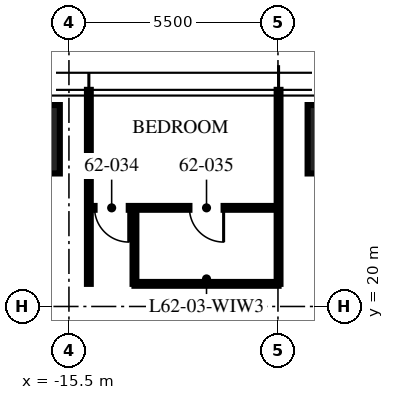
"""IFC4 building model, lengths in metres.
Left out: names, types, materials, properties, quantities, classifications, styles, units other than length and angle.
Written with IfcOpenShell. Run it as: python <this file> out.ifc"""

import sys

from ifc_helpers import new_model, si_unit, direction, frame, frame_2d, origin, origin_2d, place, context, subcontext, project, spatial, rectangle, extrude, element, fill, save


model = new_model("IFC4")
c1 = context("Model", 3, precision=1e-05, world=origin(), true_north=direction((0.0, 1.0)))
c2 = subcontext(c1, "Body", "Model", "MODEL_VIEW")
j1 = project(units=[si_unit("LENGTHUNIT", "METRE"), si_unit("PLANEANGLEUNIT", "RADIAN")], contexts=[c1])
p1 = place(None, origin())
s1 = spatial("IfcSite", under=j1, at=p1, CompositionType="ELEMENT")
p2 = place(p1, origin())
s2 = spatial("IfcBuilding", under=s1, at=p2, CompositionType="ELEMENT")
p3 = place(p2, frame((0.0, 0.0, 248.25)))
s3 = spatial("IfcBuildingStorey", under=s2, at=p3, CompositionType="ELEMENT", Elevation=248.25)
for number, where, z_axis, x_axis in (
    (1, (-16.64, 24.4, 0.0), (0.0, 0.0, 1.0), (1.0, 0.0, 0.0)),
    (2, (-8.32, 24.4, 0.0), (0.0, 0.0, 1.0), (1.0, 0.0, 0.0)),
):
    element("IfcColumn", number, at=place(p3, frame(where, z_axis=z_axis, x_axis=x_axis)), inside=s3, PredefinedType="COLUMN", context=c2, shape_type="SweptSolid", body=[
        extrude(rectangle(XDim=1.8, YDim=1.8, at=origin_2d()), origin(), (0.0, 0.0, 1.0), 3.75),
    ])
for number, where, z_axis, x_axis in (
    (3, (-9.984, 20.595, 0.0), (0.0, 0.0, 1.0), (0.0, 1.0, 0.0)),
    (4, (-14.976, 20.595, 0.0), (0.0, 0.0, 1.0), (0.0, 1.0, 0.0)),
):
    element("IfcWall", number, at=place(p3, frame(where, z_axis=z_axis, x_axis=x_axis)), inside=s3, PredefinedType="PARTITIONING", context=c2, shape_type="SweptSolid", body=[
        extrude(rectangle(XDim=5.105, YDim=0.1, at=frame_2d((2.552, 0.0))), origin(), (0.0, 0.0, 1.0), 2.91),
    ])
p4 = place(p3, frame((-9.984, 22.595, 0.0), z_axis=(0.0, 0.0, 1.0), x_axis=(-1.0, 0.0, 0.0)))
e5 = element("IfcWall", 5, at=p4, inside=s3, PredefinedType="PARTITIONING", context=c2, shape_type="SweptSolid", body=[
    extrude(rectangle(XDim=4.992, YDim=0.1, at=frame_2d((2.496, 0.0))), origin(), (0.0, 0.0, 1.0), 2.81),
])
p5 = place(p4, frame((3.942, 0.0, 0.0)))
e6 = element("IfcOpeningElement", 6, at=p5, cuts=e5, PredefinedType="OPENING", context=c2, shape_type="SweptSolid", body=[
    extrude(rectangle(XDim=0.9, YDim=2.1, at=frame_2d((0.45, 1.05))), frame((0.0, 0.06, 0.0), z_axis=(0.0, -1.0, 0.0), x_axis=(1.0, 0.0, 0.0)), (0.0, 0.0, 1.0), 0.12),
])
p6 = place(p4, frame((1.446, 0.0, 0.0)))
e7 = element("IfcOpeningElement", 7, at=p6, cuts=e5, PredefinedType="OPENING", context=c2, shape_type="SweptSolid", body=[
    extrude(rectangle(XDim=0.9, YDim=2.1, at=frame_2d((0.45, 1.05))), frame((0.0, 0.06, 0.0), z_axis=(0.0, -1.0, 0.0), x_axis=(1.0, 0.0, 0.0)), (0.0, 0.0, 1.0), 0.12),
])
p7 = place(p3, frame((-13.776, 20.595, 0.0), z_axis=(0.0, 0.0, 1.0), x_axis=(0.0, 1.0, 0.0)))
e8 = element("IfcWall", 8, at=p7, inside=s3, PredefinedType="PARTITIONING", context=c2, shape_type="SweptSolid", body=[
    extrude(rectangle(XDim=2.0, YDim=0.1, at=frame_2d((1.0, 0.0))), origin(), (0.0, 0.0, 1.0), 3.5),
])
p8 = place(p3, frame((-9.984, 20.595, 0.0), z_axis=(0.0, 0.0, 1.0), x_axis=(-1.0, 0.0, 0.0)))
e9 = element("IfcWall", 9, at=p8, inside=s3, PredefinedType="PARTITIONING", context=c2, shape_type="SweptSolid", body=[
    extrude(rectangle(XDim=3.792, YDim=0.1, at=frame_2d((1.896, 0.0))), origin(), (0.0, 0.0, 1.0), 2.81),
])
p9 = place(p5, origin())
e10 = element("IfcDoor", 10, at=p9, inside=s3, OperationType="SINGLE_SWING_LEFT", PredefinedType="DOOR", context=c2, shape_type="SweptSolid", body=[
    extrude(rectangle(XDim=0.9, YDim=2.1, at=frame_2d((0.45, 1.05))), frame((0.0, 0.025, 0.0), z_axis=(0.0, -1.0, 0.0), x_axis=(1.0, 0.0, 0.0)), (0.0, 0.0, 1.0), 0.05),
])
fill(e6, e10)
p10 = place(p6, origin())
e11 = element("IfcDoor", 11, at=p10, inside=s3, OperationType="SINGLE_SWING_LEFT", PredefinedType="DOOR", context=c2, shape_type="SweptSolid", body=[
    extrude(rectangle(XDim=0.9, YDim=2.1, at=frame_2d((0.45, 1.05))), frame((0.0, 0.025, 0.0), z_axis=(0.0, -1.0, 0.0), x_axis=(1.0, 0.0, 0.0)), (0.0, 0.0, 1.0), 0.05),
])
fill(e7, e11)
save(model, sys.argv[1])
